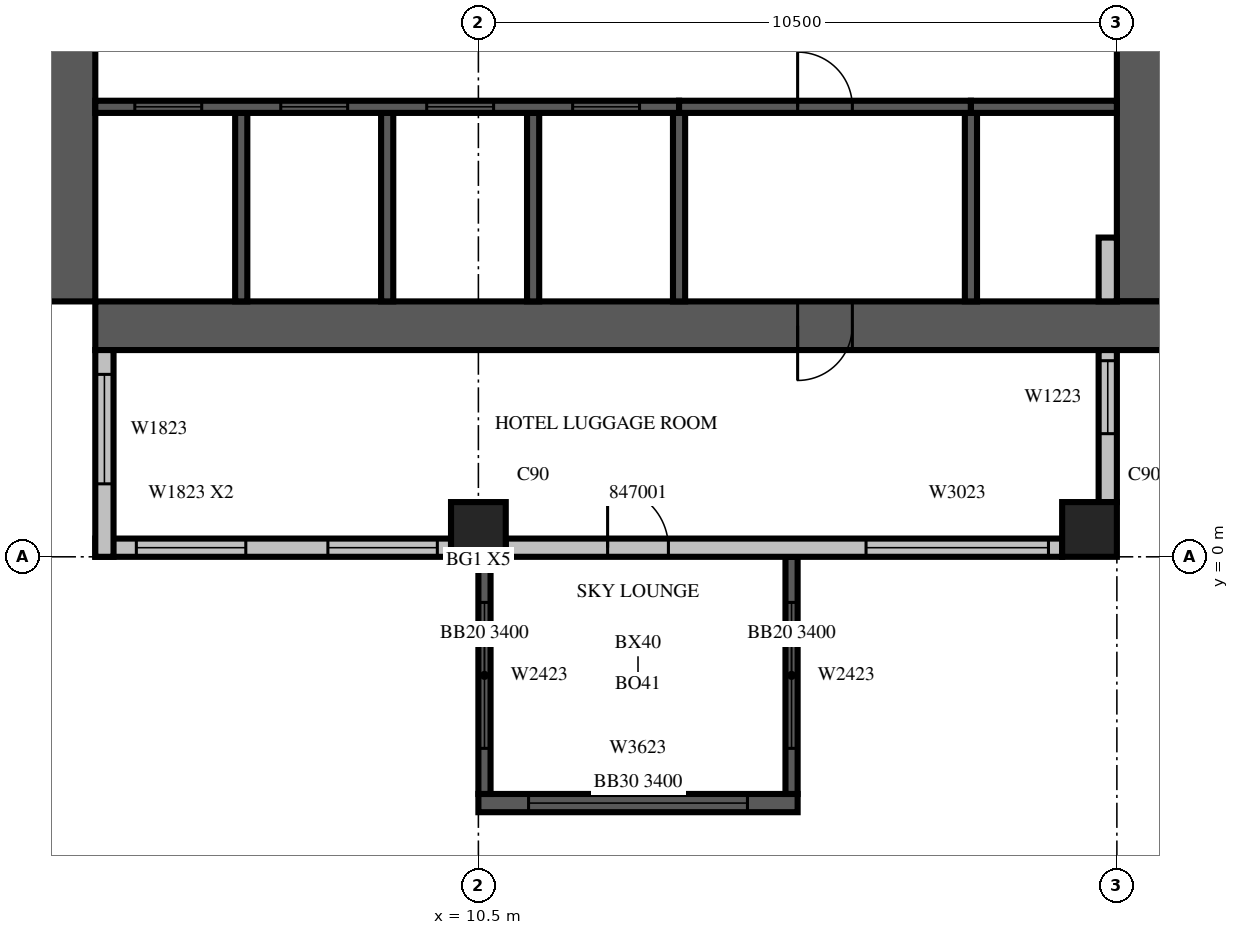
"""IFC4 building model, lengths in metres.
Left out: names, types, materials, properties, quantities, classifications, styles, units other than length and angle.
Written with IfcOpenShell. Run it as: python <this file> out.ifc"""

import sys

from ifc_helpers import new_model, si_unit, direction, frame, frame_2d, origin, origin_2d, place, context, subcontext, project, spatial, rectangle, extrude, source, transform, mapped, element, fill, save


model = new_model("IFC4")
c1 = context("Model", 3, precision=1e-05, world=origin(), true_north=direction((0.0, 1.0)))
c2 = subcontext(c1, "Body", "Model", "MODEL_VIEW")
j1 = project(units=[si_unit("LENGTHUNIT", "METRE"), si_unit("PLANEANGLEUNIT", "RADIAN")], contexts=[c1])
p1 = place(None, origin())
s1 = spatial("IfcSite", under=j1, at=p1, CompositionType="ELEMENT")
p2 = place(p1, origin())
s2 = spatial("IfcBuilding", under=s1, at=p2, CompositionType="ELEMENT")
p3 = place(p2, frame((0.0, 0.0, 212.0)))
s3 = spatial("IfcBuildingStorey", under=s2, at=p3, CompositionType="ELEMENT", Elevation=212.0)
m1 = source(origin(), c2, "Body", "SweptSolid", [
    extrude(rectangle(XDim=0.9, YDim=0.9, at=origin_2d()), origin(), (0.0, 0.0, 1.0), 3.8),
])
for number, where, z_axis, x_axis in (
    (1, (10.5, 0.45, 0.0), (0.0, 0.0, 1.0), (1.0, 0.0, 0.0)),
    (2, (20.55, 0.45, 0.0), (0.0, 0.0, 1.0), (1.0, 0.0, 0.0)),
):
    element("IfcColumn", number, at=place(p3, frame(where, z_axis=z_axis, x_axis=x_axis)), inside=s3, PredefinedType="COLUMN", context=c2, shape_type="MappedRepresentation", body=[
        mapped(m1, transform((0.0, 0.0, 0.0), scale=1.0)),
    ])
m2 = source(origin(), c2, "Body", "SweptSolid", [
    extrude(rectangle(XDim=17.6, YDim=0.8, at=frame_2d((8.8, 0.0))), origin(), (0.0, 0.0, 1.0), 3.8),
])
p4 = place(p3, frame((3.8, 4.2, 0.0), z_axis=(0.0, 0.0, 1.0), x_axis=(0.0, 1.0, 0.0)))
e3 = element("IfcWall", 3, at=p4, inside=s3, PredefinedType="SHEAR", context=c2, shape_type="MappedRepresentation", body=[
    mapped(m2, transform((0.0, 0.0, 0.0), scale=1.0)),
])
m3 = source(origin(), c2, "Body", "SweptSolid", [
    extrude(rectangle(XDim=2.2, YDim=2.1, at=frame_2d((1.1, 1.05))), frame((0.0, 0.41, 0.0), z_axis=(0.0, -1.0, 0.0), x_axis=(1.0, 0.0, 0.0)), (0.0, 0.0, 1.0), 0.82),
])
p5 = place(p4, frame((4.2, 0.0, 0.0)))
e4 = element("IfcOpeningElement", 4, at=p5, cuts=e3, PredefinedType="OPENING", context=c2, shape_type="MappedRepresentation", body=[
    mapped(m3, transform((0.0, 0.0, 0.0), scale=1.0)),
])
m4 = source(origin(), c2, "Body", "SweptSolid", [
    extrude(rectangle(XDim=0.9, YDim=2.1, at=frame_2d((0.45, 1.05))), frame((0.0, 0.41, 0.0), z_axis=(0.0, -1.0, 0.0), x_axis=(1.0, 0.0, 0.0)), (0.0, 0.0, 1.0), 0.82),
])
p6 = place(p4, frame((10.95, 0.0, 0.0)))
e5 = element("IfcOpeningElement", 5, at=p6, cuts=e3, PredefinedType="OPENING", context=c2, shape_type="MappedRepresentation", body=[
    mapped(m4, transform((0.0, 0.0, 0.0), scale=1.0)),
])
m5 = source(origin(), c2, "Body", "SweptSolid", [
    extrude(rectangle(XDim=16.8, YDim=0.8, at=frame_2d((8.4, 0.0))), origin(), (0.0, 0.0, 1.0), 3.8),
])
p7 = place(p3, frame((21.4, 4.2, 0.0), z_axis=(0.0, 0.0, 1.0), x_axis=(0.0, 1.0, 0.0)))
e6 = element("IfcWall", 6, at=p7, inside=s3, PredefinedType="SHEAR", context=c2, shape_type="MappedRepresentation", body=[
    mapped(m5, transform((0.0, 0.0, 0.0), scale=1.0)),
])
m6 = source(origin(), c2, "Body", "SweptSolid", [
    extrude(rectangle(XDim=1.2, YDim=2.1, at=frame_2d((0.6, 1.05))), frame((0.0, 0.41, 0.0), z_axis=(0.0, -1.0, 0.0), x_axis=(1.0, 0.0, 0.0)), (0.0, 0.0, 1.0), 0.82),
])
p8 = place(p7, frame((14.7, 0.0, 0.0)))
e7 = element("IfcOpeningElement", 7, at=p8, cuts=e6, PredefinedType="OPENING", context=c2, shape_type="MappedRepresentation", body=[
    mapped(m6, transform((0.0, 0.0, 0.0), scale=1.0)),
])
p9 = place(p3, frame((4.2, 3.8, 0.0), z_axis=(0.0, 0.0, 1.0), x_axis=(1.0, 0.0, 0.0)))
e8 = element("IfcWall", 8, at=p9, inside=s3, PredefinedType="SHEAR", context=c2, shape_type="MappedRepresentation", body=[
    mapped(m2, transform((0.0, 0.0, 0.0), scale=1.0)),
])
p10 = place(p9, frame((11.55, 0.0, 0.0)))
e9 = element("IfcOpeningElement", 9, at=p10, cuts=e8, PredefinedType="OPENING", context=c2, shape_type="MappedRepresentation", body=[
    mapped(m4, transform((0.0, 0.0, 0.0), scale=1.0)),
])
m7 = source(origin(), c2, "Body", "SweptSolid", [
    extrude(rectangle(XDim=5.25, YDim=0.3, at=frame_2d((2.625, 0.0))), origin(), (0.0, 0.0, 1.0), 3.4),
])
p11 = place(p3, frame((10.5, -4.05, 0.0), z_axis=(0.0, 0.0, 1.0), x_axis=(1.0, 0.0, 0.0)))
e10 = element("IfcWall", 10, at=p11, inside=s3, PredefinedType="SOLIDWALL", context=c2, shape_type="MappedRepresentation", body=[
    mapped(m7, transform((0.0, 0.0, 0.0), scale=1.0)),
])
m8 = source(origin(), c2, "Body", "SweptSolid", [
    extrude(rectangle(XDim=3.6, YDim=2.3, at=frame_2d((1.8, 1.15))), frame((0.0, 0.16, 0.0), z_axis=(0.0, -1.0, 0.0), x_axis=(1.0, 0.0, 0.0)), (0.0, 0.0, 1.0), 0.32),
])
p12 = place(p11, frame((0.825, 0.0, 0.6)))
e11 = element("IfcOpeningElement", 11, at=p12, cuts=e10, PredefinedType="OPENING", context=c2, shape_type="MappedRepresentation", body=[
    mapped(m8, transform((0.0, 0.0, 0.0), scale=1.0)),
])
m9 = source(origin(), c2, "Body", "SweptSolid", [
    extrude(rectangle(XDim=3.9, YDim=0.2, at=frame_2d((1.95, 0.0))), origin(), (0.0, 0.0, 1.0), 3.4),
])
p13 = place(p3, frame((10.6, 0.0, 0.0), z_axis=(0.0, 0.0, 1.0), x_axis=(0.0, -1.0, 0.0)))
e12 = element("IfcWall", 12, at=p13, inside=s3, PredefinedType="SOLIDWALL", context=c2, shape_type="MappedRepresentation", body=[
    mapped(m9, transform((0.0, 0.0, 0.0), scale=1.0)),
])
m10 = source(origin(), c2, "Body", "SweptSolid", [
    extrude(rectangle(XDim=2.4, YDim=2.3, at=frame_2d((1.2, 1.15))), frame((0.0, 0.11, 0.0), z_axis=(0.0, -1.0, 0.0), x_axis=(1.0, 0.0, 0.0)), (0.0, 0.0, 1.0), 0.22),
])
p14 = place(p13, frame((0.75, 0.0, 0.6)))
e13 = element("IfcOpeningElement", 13, at=p14, cuts=e12, PredefinedType="OPENING", context=c2, shape_type="MappedRepresentation", body=[
    mapped(m10, transform((0.0, 0.0, 0.0), scale=1.0)),
])
p15 = place(p3, frame((15.65, 0.0, 0.0), z_axis=(0.0, 0.0, 1.0), x_axis=(0.0, -1.0, 0.0)))
e14 = element("IfcWall", 14, at=p15, inside=s3, PredefinedType="SOLIDWALL", context=c2, shape_type="MappedRepresentation", body=[
    mapped(m9, transform((0.0, 0.0, 0.0), scale=1.0)),
])
p16 = place(p15, frame((0.75, 0.0, 0.6)))
e15 = element("IfcOpeningElement", 15, at=p16, cuts=e14, PredefinedType="OPENING", context=c2, shape_type="MappedRepresentation", body=[
    mapped(m10, transform((0.0, 0.0, 0.0), scale=1.0)),
])
m11 = source(origin(), c2, "Body", "SweptSolid", [
    extrude(rectangle(XDim=5.85, YDim=0.3, at=frame_2d((2.925, 0.0))), origin(), (0.0, 0.0, 1.0), 3.4),
])
p17 = place(p3, frame((4.2, 0.15, 0.0), z_axis=(0.0, 0.0, 1.0), x_axis=(1.0, 0.0, 0.0)))
e16 = element("IfcWall", 16, at=p17, inside=s3, PredefinedType="STANDARD", context=c2, shape_type="MappedRepresentation", body=[
    mapped(m11, transform((0.0, 0.0, 0.0), scale=1.0)),
])
m12 = source(origin(), c2, "Body", "SweptSolid", [
    extrude(rectangle(XDim=1.8, YDim=2.3, at=frame_2d((0.9, 1.15))), frame((0.0, 0.16, 0.0), z_axis=(0.0, -1.0, 0.0), x_axis=(1.0, 0.0, 0.0)), (0.0, 0.0, 1.0), 0.32),
])
p18 = place(p17, frame((0.675, 0.0, 0.6)))
e17 = element("IfcOpeningElement", 17, at=p18, cuts=e16, PredefinedType="OPENING", context=c2, shape_type="MappedRepresentation", body=[
    mapped(m12, transform((0.0, 0.0, 0.0), scale=1.0)),
])
p19 = place(p17, frame((3.825, 0.0, 0.6)))
e18 = element("IfcOpeningElement", 18, at=p19, cuts=e16, PredefinedType="OPENING", context=c2, shape_type="MappedRepresentation", body=[
    mapped(m12, transform((0.0, 0.0, 0.0), scale=1.0)),
])
m13 = source(origin(), c2, "Body", "SweptSolid", [
    extrude(rectangle(XDim=9.15, YDim=0.3, at=frame_2d((4.575, 0.0))), origin(), (0.0, 0.0, 1.0), 3.4),
])
p20 = place(p3, frame((10.95, 0.15, 0.0), z_axis=(0.0, 0.0, 1.0), x_axis=(1.0, 0.0, 0.0)))
e19 = element("IfcWall", 19, at=p20, inside=s3, PredefinedType="STANDARD", context=c2, shape_type="MappedRepresentation", body=[
    mapped(m13, transform((0.0, 0.0, 0.0), scale=1.0)),
])
m14 = source(origin(), c2, "Body", "SweptSolid", [
    extrude(rectangle(XDim=3.0, YDim=2.3, at=frame_2d((1.5, 1.15))), frame((0.0, 0.16, 0.0), z_axis=(0.0, -1.0, 0.0), x_axis=(1.0, 0.0, 0.0)), (0.0, 0.0, 1.0), 0.32),
])
p21 = place(p20, frame((5.925, 0.0, 0.6)))
e20 = element("IfcOpeningElement", 20, at=p21, cuts=e19, PredefinedType="OPENING", context=c2, shape_type="MappedRepresentation", body=[
    mapped(m14, transform((0.0, 0.0, 0.0), scale=1.0)),
])
m15 = source(origin(), c2, "Body", "SweptSolid", [
    extrude(rectangle(XDim=1.0, YDim=2.1, at=frame_2d((0.5, 1.05))), frame((0.0, 0.16, 0.0), z_axis=(0.0, -1.0, 0.0), x_axis=(1.0, 0.0, 0.0)), (0.0, 0.0, 1.0), 0.32),
])
p22 = place(p20, frame((1.675, 0.0, 0.0)))
e21 = element("IfcOpeningElement", 21, at=p22, cuts=e19, PredefinedType="OPENING", context=c2, shape_type="MappedRepresentation", body=[
    mapped(m15, transform((0.0, 0.0, 0.0), scale=1.0)),
])
m16 = source(origin(), c2, "Body", "SweptSolid", [
    extrude(rectangle(XDim=2.5, YDim=0.3, at=frame_2d((1.25, 0.0))), origin(), (0.0, 0.0, 1.0), 3.4),
])
p23 = place(p3, frame((20.85, 0.9, 0.0), z_axis=(0.0, 0.0, 1.0), x_axis=(0.0, 1.0, 0.0)))
e22 = element("IfcWall", 22, at=p23, inside=s3, PredefinedType="STANDARD", context=c2, shape_type="MappedRepresentation", body=[
    mapped(m16, transform((0.0, 0.0, 0.0), scale=1.0)),
])
m17 = source(origin(), c2, "Body", "SweptSolid", [
    extrude(rectangle(XDim=1.2, YDim=2.3, at=frame_2d((0.6, 1.15))), frame((0.0, 0.16, 0.0), z_axis=(0.0, -1.0, 0.0), x_axis=(1.0, 0.0, 0.0)), (0.0, 0.0, 1.0), 0.32),
])
p24 = place(p23, frame((1.125, 0.0, 0.6)))
e23 = element("IfcOpeningElement", 23, at=p24, cuts=e22, PredefinedType="OPENING", context=c2, shape_type="MappedRepresentation", body=[
    mapped(m17, transform((0.0, 0.0, 0.0), scale=1.0)),
])
m18 = source(origin(), c2, "Body", "SweptSolid", [
    extrude(rectangle(XDim=1.05, YDim=0.3, at=frame_2d((0.525, 0.0))), origin(), (0.0, 0.0, 1.0), 3.4),
])
p25 = place(p3, frame((20.85, 4.2, 0.0), z_axis=(0.0, 0.0, 1.0), x_axis=(0.0, 1.0, 0.0)))
e24 = element("IfcWall", 24, at=p25, inside=s3, PredefinedType="STANDARD", context=c2, shape_type="MappedRepresentation", body=[
    mapped(m18, transform((0.0, 0.0, 0.0), scale=1.0)),
])
m19 = source(origin(), c2, "Body", "SweptSolid", [
    extrude(rectangle(XDim=3.4, YDim=0.3, at=frame_2d((1.7, 0.0))), origin(), (0.0, 0.0, 1.0), 3.4),
])
p26 = place(p3, frame((4.35, 3.4, 0.0), z_axis=(0.0, 0.0, 1.0), x_axis=(0.0, -1.0, 0.0)))
e25 = element("IfcWall", 25, at=p26, inside=s3, PredefinedType="STANDARD", context=c2, shape_type="MappedRepresentation", body=[
    mapped(m19, transform((0.0, 0.0, 0.0), scale=1.0)),
])
p27 = place(p26, frame((0.4, 0.0, 0.6)))
e26 = element("IfcOpeningElement", 26, at=p27, cuts=e25, PredefinedType="OPENING", context=c2, shape_type="MappedRepresentation", body=[
    mapped(m12, transform((0.0, 0.0, 0.0), scale=1.0)),
])
m20 = source(origin(), c2, "Body", "SweptSolid", [
    extrude(rectangle(XDim=3.1, YDim=0.2, at=frame_2d((1.55, 0.0))), origin(), (0.0, 0.0, 1.0), 3.8),
])
for number, where, z_axis, x_axis in (
    (27, (6.6, 4.2, 0.0), (0.0, 0.0, 1.0), (0.0, 1.0, 0.0)),
    (28, (9.0, 4.2, 0.0), (0.0, 0.0, 1.0), (0.0, 1.0, 0.0)),
    (29, (11.4, 4.2, 0.0), (0.0, 0.0, 1.0), (0.0, 1.0, 0.0)),
):
    element("IfcWall", number, at=place(p3, frame(where, z_axis=z_axis, x_axis=x_axis)), inside=s3, PredefinedType="SOLIDWALL", context=c2, shape_type="MappedRepresentation", body=[
        mapped(m20, transform((0.0, 0.0, 0.0), scale=1.0)),
    ])
m21 = source(origin(), c2, "Body", "SweptSolid", [
    extrude(rectangle(XDim=3.1, YDim=0.2, at=frame_2d((1.55, 0.0))), origin(), (0.0, 0.0, 1.0), 3.4),
])
for number, where, z_axis, x_axis in (
    (30, (13.8, 4.2, 0.0), (0.0, 0.0, 1.0), (0.0, 1.0, 0.0)),
    (31, (18.6, 4.2, 0.0), (0.0, 0.0, 1.0), (0.0, 1.0, 0.0)),
):
    element("IfcWall", number, at=place(p3, frame(where, z_axis=z_axis, x_axis=x_axis)), inside=s3, PredefinedType="SOLIDWALL", context=c2, shape_type="MappedRepresentation", body=[
        mapped(m21, transform((0.0, 0.0, 0.0), scale=1.0)),
    ])
m22 = source(origin(), c2, "Body", "SweptSolid", [
    extrude(rectangle(XDim=9.6, YDim=0.2, at=frame_2d((4.8, 0.0))), origin(), (0.0, 0.0, 1.0), 3.8),
])
p28 = place(p3, frame((4.2, 7.4, 0.0), z_axis=(0.0, 0.0, 1.0), x_axis=(1.0, 0.0, 0.0)))
e32 = element("IfcWall", 32, at=p28, inside=s3, PredefinedType="SOLIDWALL", context=c2, shape_type="MappedRepresentation", body=[
    mapped(m22, transform((0.0, 0.0, 0.0), scale=1.0)),
])
m23 = source(origin(), c2, "Body", "SweptSolid", [
    extrude(rectangle(XDim=1.1, YDim=2.1, at=frame_2d((0.55, 1.05))), frame((0.0, 0.11, 0.0), z_axis=(0.0, -1.0, 0.0), x_axis=(1.0, 0.0, 0.0)), (0.0, 0.0, 1.0), 0.22),
])
p29 = place(p28, frame((0.65, 0.0, 0.0)))
e33 = element("IfcOpeningElement", 33, at=p29, cuts=e32, PredefinedType="OPENING", context=c2, shape_type="MappedRepresentation", body=[
    mapped(m23, transform((0.0, 0.0, 0.0), scale=1.0)),
])
p30 = place(p28, frame((3.05, 0.0, 0.0)))
e34 = element("IfcOpeningElement", 34, at=p30, cuts=e32, PredefinedType="OPENING", context=c2, shape_type="MappedRepresentation", body=[
    mapped(m23, transform((0.0, 0.0, 0.0), scale=1.0)),
])
p31 = place(p28, frame((5.45, 0.0, 0.0)))
e35 = element("IfcOpeningElement", 35, at=p31, cuts=e32, PredefinedType="OPENING", context=c2, shape_type="MappedRepresentation", body=[
    mapped(m23, transform((0.0, 0.0, 0.0), scale=1.0)),
])
p32 = place(p28, frame((7.85, 0.0, 0.0)))
e36 = element("IfcOpeningElement", 36, at=p32, cuts=e32, PredefinedType="OPENING", context=c2, shape_type="MappedRepresentation", body=[
    mapped(m23, transform((0.0, 0.0, 0.0), scale=1.0)),
])
m24 = source(origin(), c2, "Body", "SweptSolid", [
    extrude(rectangle(XDim=4.8, YDim=0.2, at=frame_2d((2.4, 0.0))), origin(), (0.0, 0.0, 1.0), 3.4),
])
p33 = place(p3, frame((13.8, 7.4, 0.0), z_axis=(0.0, 0.0, 1.0), x_axis=(1.0, 0.0, 0.0)))
e37 = element("IfcWall", 37, at=p33, inside=s3, PredefinedType="SOLIDWALL", context=c2, shape_type="MappedRepresentation", body=[
    mapped(m24, transform((0.0, 0.0, 0.0), scale=1.0)),
])
m25 = source(origin(), c2, "Body", "SweptSolid", [
    extrude(rectangle(XDim=0.9, YDim=2.1, at=frame_2d((0.45, 1.05))), frame((0.0, 0.11, 0.0), z_axis=(0.0, -1.0, 0.0), x_axis=(1.0, 0.0, 0.0)), (0.0, 0.0, 1.0), 0.22),
])
p34 = place(p33, frame((1.95, 0.0, 0.0)))
e38 = element("IfcOpeningElement", 38, at=p34, cuts=e37, PredefinedType="OPENING", context=c2, shape_type="MappedRepresentation", body=[
    mapped(m25, transform((0.0, 0.0, 0.0), scale=1.0)),
])
m26 = source(origin(), c2, "Body", "SweptSolid", [
    extrude(rectangle(XDim=2.4, YDim=0.2, at=frame_2d((1.2, 0.0))), origin(), (0.0, 0.0, 1.0), 3.8),
])
p35 = place(p3, frame((18.6, 7.4, 0.0), z_axis=(0.0, 0.0, 1.0), x_axis=(1.0, 0.0, 0.0)))
e39 = element("IfcWall", 39, at=p35, inside=s3, PredefinedType="SOLIDWALL", context=c2, shape_type="MappedRepresentation", body=[
    mapped(m26, transform((0.0, 0.0, 0.0), scale=1.0)),
])
m27 = source(origin(), c2, "Body", "SweptSolid", [
    extrude(rectangle(XDim=3.6, YDim=2.3, at=frame_2d((1.8, 1.15))), frame((0.0, 0.03, 0.0), z_axis=(0.0, -1.0, 0.0), x_axis=(1.0, 0.0, 0.0)), (0.0, 0.0, 1.0), 0.06),
])
p36 = place(p12, origin())
e40 = element("IfcWindow", 40, at=p36, inside=s3, PartitioningType="SINGLE_PANEL", PredefinedType="WINDOW", context=c2, shape_type="MappedRepresentation", body=[
    mapped(m27, transform((0.0, 0.0, 0.0), scale=1.0)),
])
fill(e11, e40)
m28 = source(origin(), c2, "Body", "SweptSolid", [
    extrude(rectangle(XDim=2.4, YDim=2.3, at=frame_2d((1.2, 1.15))), frame((0.0, 0.03, 0.0), z_axis=(0.0, -1.0, 0.0), x_axis=(1.0, 0.0, 0.0)), (0.0, 0.0, 1.0), 0.06),
])
p37 = place(p14, origin())
e41 = element("IfcWindow", 41, at=p37, inside=s3, PartitioningType="SINGLE_PANEL", PredefinedType="WINDOW", context=c2, shape_type="MappedRepresentation", body=[
    mapped(m28, transform((0.0, 0.0, 0.0), scale=1.0)),
])
fill(e13, e41)
p38 = place(p16, origin())
e42 = element("IfcWindow", 42, at=p38, inside=s3, PartitioningType="SINGLE_PANEL", PredefinedType="WINDOW", context=c2, shape_type="MappedRepresentation", body=[
    mapped(m28, transform((0.0, 0.0, 0.0), scale=1.0)),
])
fill(e15, e42)
m29 = source(origin(), c2, "Body", "SweptSolid", [
    extrude(rectangle(XDim=1.8, YDim=2.3, at=frame_2d((0.9, 1.15))), frame((0.0, 0.03, 0.0), z_axis=(0.0, -1.0, 0.0), x_axis=(1.0, 0.0, 0.0)), (0.0, 0.0, 1.0), 0.06),
])
p39 = place(p18, origin())
e43 = element("IfcWindow", 43, at=p39, inside=s3, PartitioningType="SINGLE_PANEL", PredefinedType="WINDOW", context=c2, shape_type="MappedRepresentation", body=[
    mapped(m29, transform((0.0, 0.0, 0.0), scale=1.0)),
])
fill(e17, e43)
p40 = place(p19, origin())
e44 = element("IfcWindow", 44, at=p40, inside=s3, PartitioningType="SINGLE_PANEL", PredefinedType="WINDOW", context=c2, shape_type="MappedRepresentation", body=[
    mapped(m29, transform((0.0, 0.0, 0.0), scale=1.0)),
])
fill(e18, e44)
m30 = source(origin(), c2, "Body", "SweptSolid", [
    extrude(rectangle(XDim=3.0, YDim=2.3, at=frame_2d((1.5, 1.15))), frame((0.0, 0.03, 0.0), z_axis=(0.0, -1.0, 0.0), x_axis=(1.0, 0.0, 0.0)), (0.0, 0.0, 1.0), 0.06),
])
p41 = place(p21, origin())
e45 = element("IfcWindow", 45, at=p41, inside=s3, PartitioningType="SINGLE_PANEL", PredefinedType="WINDOW", context=c2, shape_type="MappedRepresentation", body=[
    mapped(m30, transform((0.0, 0.0, 0.0), scale=1.0)),
])
fill(e20, e45)
m31 = source(origin(), c2, "Body", "SweptSolid", [
    extrude(rectangle(XDim=1.2, YDim=2.3, at=frame_2d((0.6, 1.15))), frame((0.0, 0.03, 0.0), z_axis=(0.0, -1.0, 0.0), x_axis=(1.0, 0.0, 0.0)), (0.0, 0.0, 1.0), 0.06),
])
p42 = place(p24, origin())
e46 = element("IfcWindow", 46, at=p42, inside=s3, PartitioningType="SINGLE_PANEL", PredefinedType="WINDOW", context=c2, shape_type="MappedRepresentation", body=[
    mapped(m31, transform((0.0, 0.0, 0.0), scale=1.0)),
])
fill(e23, e46)
p43 = place(p27, origin())
e47 = element("IfcWindow", 47, at=p43, inside=s3, PartitioningType="SINGLE_PANEL", PredefinedType="WINDOW", context=c2, shape_type="MappedRepresentation", body=[
    mapped(m29, transform((0.0, 0.0, 0.0), scale=1.0)),
])
fill(e26, e47)
m32 = source(origin(), c2, "Body", "SweptSolid", [
    extrude(rectangle(XDim=1.1, YDim=2.1, at=frame_2d((0.55, 1.05))), frame((0.0, 0.025, 0.0), z_axis=(0.0, -1.0, 0.0), x_axis=(1.0, 0.0, 0.0)), (0.0, 0.0, 1.0), 0.05),
])
p44 = place(p29, origin())
e48 = element("IfcDoor", 48, at=p44, inside=s3, OperationType="SLIDING_TO_LEFT", PredefinedType="DOOR", context=c2, shape_type="MappedRepresentation", body=[
    mapped(m32, transform((0.0, 0.0, 0.0), scale=1.0)),
])
fill(e33, e48)
p45 = place(p30, origin())
e49 = element("IfcDoor", 49, at=p45, inside=s3, OperationType="SLIDING_TO_LEFT", PredefinedType="DOOR", context=c2, shape_type="MappedRepresentation", body=[
    mapped(m32, transform((0.0, 0.0, 0.0), scale=1.0)),
])
fill(e34, e49)
p46 = place(p31, origin())
e50 = element("IfcDoor", 50, at=p46, inside=s3, OperationType="SLIDING_TO_LEFT", PredefinedType="DOOR", context=c2, shape_type="MappedRepresentation", body=[
    mapped(m32, transform((0.0, 0.0, 0.0), scale=1.0)),
])
fill(e35, e50)
p47 = place(p32, origin())
e51 = element("IfcDoor", 51, at=p47, inside=s3, OperationType="SLIDING_TO_LEFT", PredefinedType="DOOR", context=c2, shape_type="MappedRepresentation", body=[
    mapped(m32, transform((0.0, 0.0, 0.0), scale=1.0)),
])
fill(e36, e51)
m33 = source(origin(), c2, "Body", "SweptSolid", [
    extrude(rectangle(XDim=0.9, YDim=2.1, at=frame_2d((0.45, 1.05))), frame((0.0, 0.025, 0.0), z_axis=(0.0, -1.0, 0.0), x_axis=(1.0, 0.0, 0.0)), (0.0, 0.0, 1.0), 0.05),
])
p48 = place(p34, origin())
e52 = element("IfcDoor", 52, at=p48, inside=s3, OperationType="SINGLE_SWING_LEFT", PredefinedType="DOOR", context=c2, shape_type="MappedRepresentation", body=[
    mapped(m33, transform((0.0, 0.0, 0.0), scale=1.0)),
])
fill(e38, e52)
p49 = place(p10, origin())
e53 = element("IfcDoor", 53, at=p49, inside=s3, OperationType="SINGLE_SWING_RIGHT", PredefinedType="DOOR", context=c2, shape_type="MappedRepresentation", body=[
    mapped(m33, transform((0.0, 0.0, 0.0), scale=1.0)),
])
fill(e9, e53)
m34 = source(origin(), c2, "Body", "SweptSolid", [
    extrude(rectangle(XDim=1.0, YDim=2.1, at=frame_2d((0.5, 1.05))), frame((0.0, 0.025, 0.0), z_axis=(0.0, -1.0, 0.0), x_axis=(1.0, 0.0, 0.0)), (0.0, 0.0, 1.0), 0.05),
])
p50 = place(p22, origin())
e54 = element("IfcDoor", 54, at=p50, inside=s3, OperationType="SINGLE_SWING_LEFT", PredefinedType="DOOR", context=c2, shape_type="MappedRepresentation", body=[
    mapped(m34, transform((0.0, 0.0, 0.0), scale=1.0)),
])
fill(e21, e54)
save(model, sys.argv[1])
